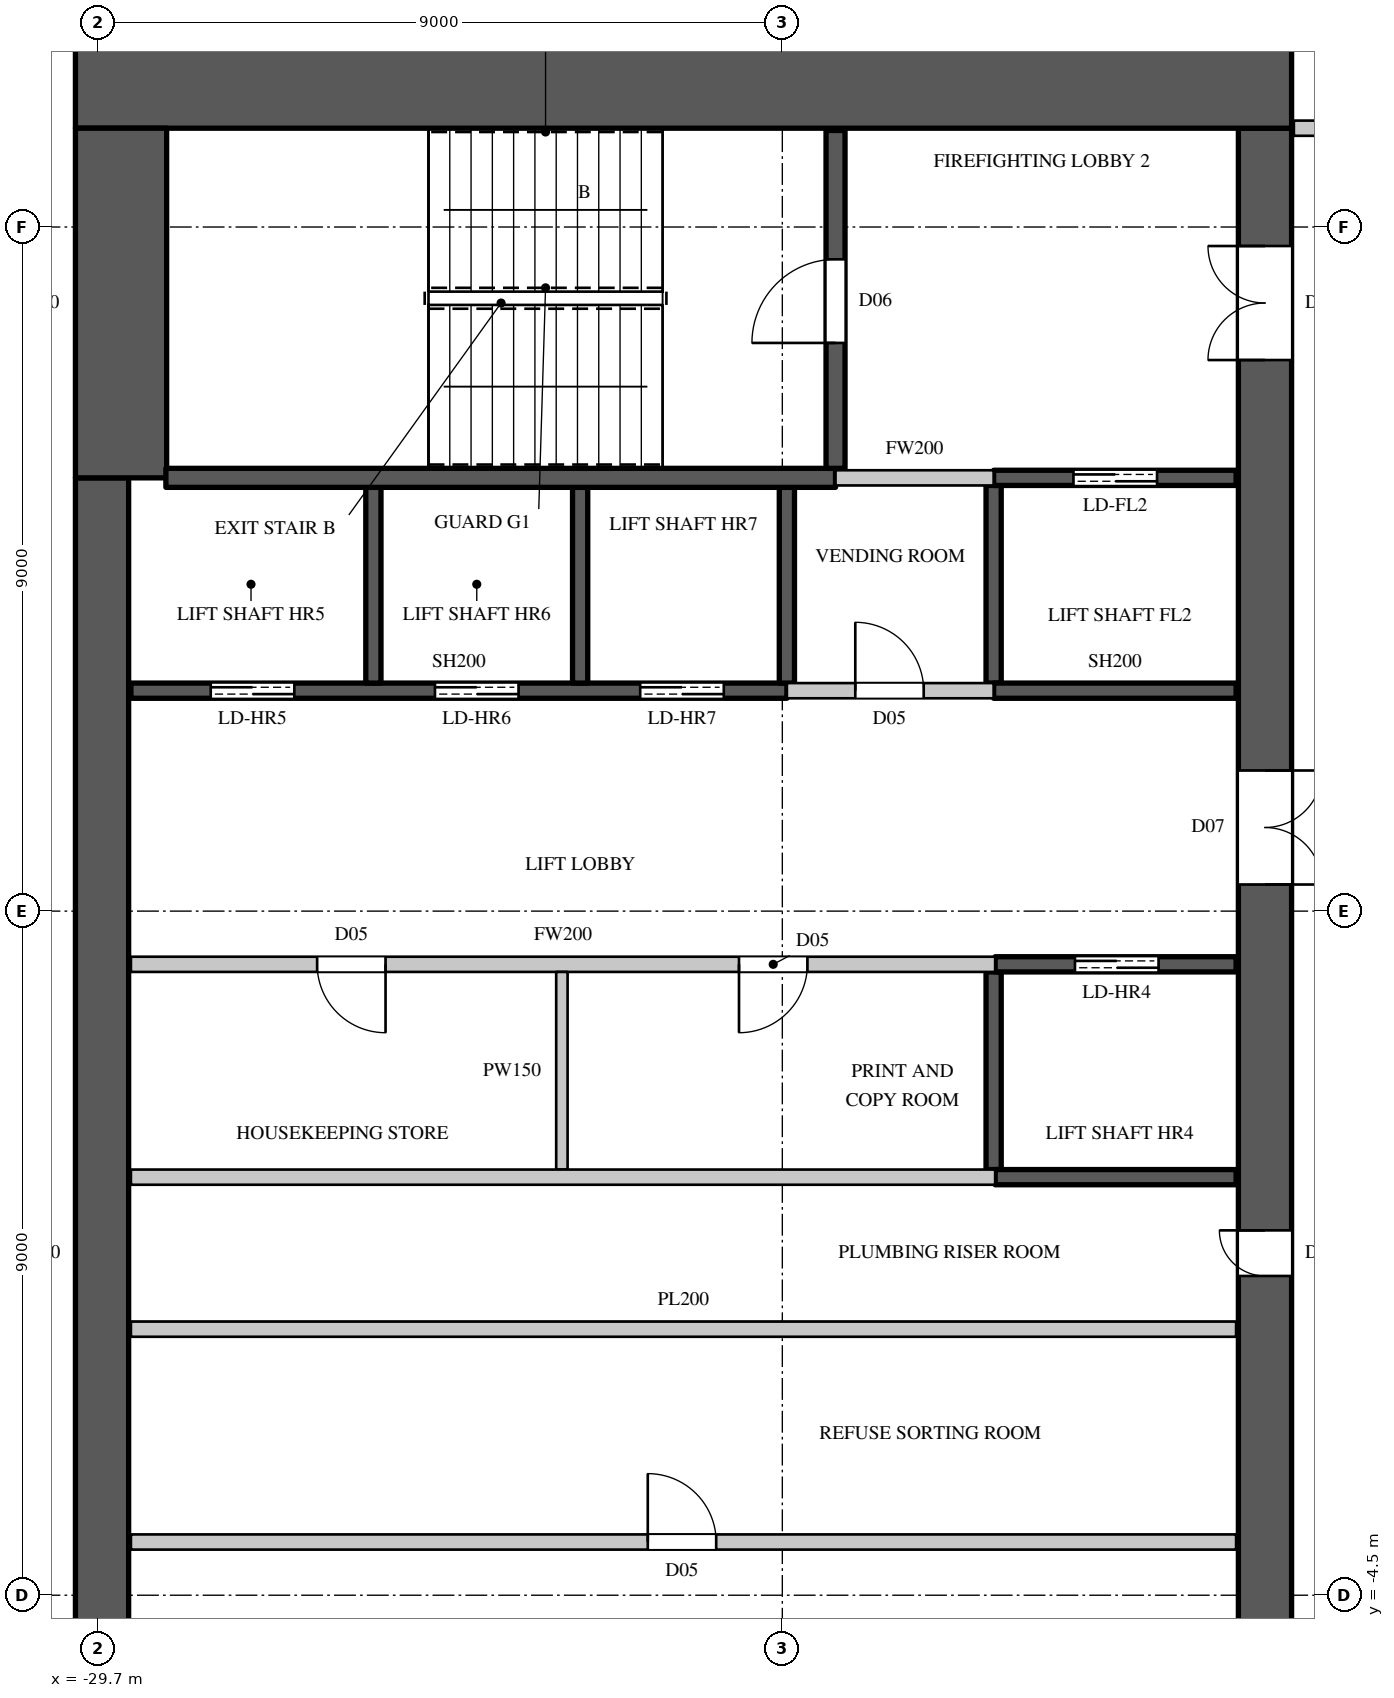
"""IFC4 building model, lengths in metres.
Left out: names, types, materials, properties, quantities, classifications, styles, units other than length and angle.
Written with IfcOpenShell. Run it as: python <this file> out.ifc"""

import sys

from ifc_helpers import new_model, si_unit, direction, frame, frame_2d, origin, place, context, subcontext, project, spatial, rectangle, extrude, element, fill, save


model = new_model("IFC4")
c1 = context("Model", 3, precision=1e-05, world=origin(), true_north=direction((0.0, 1.0)))
c2 = subcontext(c1, "Body", "Model", "MODEL_VIEW")
j1 = project(units=[si_unit("LENGTHUNIT", "METRE"), si_unit("PLANEANGLEUNIT", "RADIAN")], contexts=[c1])
p1 = place(None, origin())
s1 = spatial("IfcSite", under=j1, at=p1, CompositionType="ELEMENT")
p2 = place(p1, origin())
s2 = spatial("IfcBuilding", under=s1, at=p2, CompositionType="ELEMENT")
p3 = place(p2, frame((0.0, 0.0, 304.9)))
s3 = spatial("IfcBuildingStorey", under=s2, at=p3, CompositionType="ELEMENT", Elevation=304.9)
p4 = place(p3, frame((-30.0, 15.4, 0.0), z_axis=(0.0, 0.0, 1.0), x_axis=(1.0, 0.0, 0.0)))
e1 = element("IfcWall", 1, at=p4, inside=s3, PredefinedType="SHEAR", context=c2, shape_type="SweptSolid", body=[
    extrude(rectangle(XDim=16.0, YDim=1.2, at=frame_2d((8.0, 0.0))), origin(), (0.0, 0.0, 1.0), 4.1),
])
p5 = place(p3, frame((-14.35, -14.8, 0.0), z_axis=(0.0, 0.0, 1.0), x_axis=(0.0, 1.0, 0.0)))
e2 = element("IfcWall", 2, at=p5, inside=s3, PredefinedType="SHEAR", context=c2, shape_type="SweptSolid", body=[
    extrude(rectangle(XDim=29.6, YDim=0.7, at=frame_2d((14.8, 0.0))), origin(), (0.0, 0.0, 1.0), 4.1),
])
p6 = place(p5, frame((1.55, 0.0, 0.0)))
e3 = element("IfcOpeningElement", 3, at=p6, cuts=e2, PredefinedType="OPENING", context=c2, shape_type="SweptSolid", body=[
    extrude(rectangle(XDim=1.5, YDim=2.4, at=frame_2d((0.75, 1.2))), frame((0.0, 0.36, 0.0), z_axis=(0.0, -1.0, 0.0), x_axis=(1.0, 0.0, 0.0)), (0.0, 0.0, 1.0), 0.72),
])
p7 = place(p5, frame((26.55, 0.0, 0.0)))
e4 = element("IfcOpeningElement", 4, at=p7, cuts=e2, PredefinedType="OPENING", context=c2, shape_type="SweptSolid", body=[
    extrude(rectangle(XDim=1.5, YDim=2.4, at=frame_2d((0.75, 1.2))), frame((0.0, 0.36, 0.0), z_axis=(0.0, -1.0, 0.0), x_axis=(1.0, 0.0, 0.0)), (0.0, 0.0, 1.0), 0.72),
])
p8 = place(p5, frame((8.45, 0.0, 0.0)))
e5 = element("IfcOpeningElement", 5, at=p8, cuts=e2, PredefinedType="OPENING", context=c2, shape_type="SweptSolid", body=[
    extrude(rectangle(XDim=1.5, YDim=2.4, at=frame_2d((0.75, 1.2))), frame((0.0, 0.36, 0.0), z_axis=(0.0, -1.0, 0.0), x_axis=(1.0, 0.0, 0.0)), (0.0, 0.0, 1.0), 0.72),
])
p9 = place(p5, frame((19.65, 0.0, 0.0)))
e6 = element("IfcOpeningElement", 6, at=p9, cuts=e2, PredefinedType="OPENING", context=c2, shape_type="SweptSolid", body=[
    extrude(rectangle(XDim=1.5, YDim=2.4, at=frame_2d((0.75, 1.2))), frame((0.0, 0.36, 0.0), z_axis=(0.0, -1.0, 0.0), x_axis=(1.0, 0.0, 0.0)), (0.0, 0.0, 1.0), 0.72),
])
p10 = place(p5, frame((14.5, 0.0, 0.0)))
e7 = element("IfcOpeningElement", 7, at=p10, cuts=e2, PredefinedType="OPENING", context=c2, shape_type="SweptSolid", body=[
    extrude(rectangle(XDim=0.6, YDim=2.0, at=frame_2d((0.3, 1.0))), frame((0.0, 0.36, 0.0), z_axis=(0.0, -1.0, 0.0), x_axis=(1.0, 0.0, 0.0)), (0.0, 0.0, 1.0), 0.72),
])
p11 = place(p3, frame((-29.65, -10.2, 0.0), z_axis=(0.0, 0.0, 1.0), x_axis=(0.0, 1.0, 0.0)))
e8 = element("IfcWall", 8, at=p11, inside=s3, PredefinedType="SHEAR", context=c2, shape_type="SweptSolid", body=[
    extrude(rectangle(XDim=20.4, YDim=0.7, at=frame_2d((10.2, 0.0))), origin(), (0.0, 0.0, 1.0), 4.1),
])
p12 = place(p3, frame((-29.4, 10.2, 0.0), z_axis=(0.0, 0.0, 1.0), x_axis=(0.0, 1.0, 0.0)))
e9 = element("IfcWall", 9, at=p12, inside=s3, PredefinedType="SHEAR", context=c2, shape_type="SweptSolid", body=[
    extrude(rectangle(XDim=4.6, YDim=1.2, at=frame_2d((2.3, 0.0))), origin(), (0.0, 0.0, 1.0), 4.1),
])
p13 = place(p3, frame((-29.27, -3.8, 0.0), z_axis=(0.0, 0.0, 1.0), x_axis=(1.0, 0.0, 0.0)))
e10 = element("IfcWall", 10, at=p13, inside=s3, PredefinedType="PARTITIONING", context=c2, shape_type="SweptSolid", body=[
    extrude(rectangle(XDim=14.54, YDim=0.2, at=frame_2d((7.27, 0.0))), origin(), (0.0, 0.0, 1.0), 3.8),
])
p14 = place(p13, frame((6.8, 0.0, 0.0)))
e11 = element("IfcOpeningElement", 11, at=p14, cuts=e10, PredefinedType="OPENING", context=c2, shape_type="SweptSolid", body=[
    extrude(rectangle(XDim=0.9, YDim=2.2, at=frame_2d((0.45, 1.1))), frame((0.0, 0.11, 0.0), z_axis=(0.0, -1.0, 0.0), x_axis=(1.0, 0.0, 0.0)), (0.0, 0.0, 1.0), 0.22),
])
p15 = place(p3, frame((-29.27, 3.8, 0.0), z_axis=(0.0, 0.0, 1.0), x_axis=(1.0, 0.0, 0.0)))
e12 = element("IfcWall", 12, at=p15, inside=s3, PredefinedType="PARTITIONING", context=c2, shape_type="SweptSolid", body=[
    extrude(rectangle(XDim=11.37, YDim=0.2, at=frame_2d((5.685, 0.0))), origin(), (0.0, 0.0, 1.0), 3.8),
])
p16 = place(p15, frame((2.45, 0.0, 0.0)))
e13 = element("IfcOpeningElement", 13, at=p16, cuts=e12, PredefinedType="OPENING", context=c2, shape_type="SweptSolid", body=[
    extrude(rectangle(XDim=0.9, YDim=2.2, at=frame_2d((0.45, 1.1))), frame((0.0, 0.11, 0.0), z_axis=(0.0, -1.0, 0.0), x_axis=(1.0, 0.0, 0.0)), (0.0, 0.0, 1.0), 0.22),
])
p17 = place(p15, frame((8.0, 0.0, 0.0)))
e14 = element("IfcOpeningElement", 14, at=p17, cuts=e12, PredefinedType="OPENING", context=c2, shape_type="SweptSolid", body=[
    extrude(rectangle(XDim=0.9, YDim=2.2, at=frame_2d((0.45, 1.1))), frame((0.0, 0.11, 0.0), z_axis=(0.0, -1.0, 0.0), x_axis=(1.0, 0.0, 0.0)), (0.0, 0.0, 1.0), 0.22),
])
p18 = place(p3, frame((-20.64, 7.4, 0.0), z_axis=(0.0, 0.0, 1.0), x_axis=(1.0, 0.0, 0.0)))
e15 = element("IfcWall", 15, at=p18, inside=s3, PredefinedType="PARTITIONING", context=c2, shape_type="SweptSolid", body=[
    extrude(rectangle(XDim=2.72, YDim=0.2, at=frame_2d((1.36, 0.0))), origin(), (0.0, 0.0, 1.0), 3.8),
])
p19 = place(p18, frame((0.9, 0.0, 0.0)))
e16 = element("IfcOpeningElement", 16, at=p19, cuts=e15, PredefinedType="OPENING", context=c2, shape_type="SweptSolid", body=[
    extrude(rectangle(XDim=0.9, YDim=2.2, at=frame_2d((0.45, 1.1))), frame((0.0, 0.11, 0.0), z_axis=(0.0, -1.0, 0.0), x_axis=(1.0, 0.0, 0.0)), (0.0, 0.0, 1.0), 0.22),
])
p20 = place(p3, frame((-20.0, 10.2, 0.0), z_axis=(0.0, 0.0, 1.0), x_axis=(1.0, 0.0, 0.0)))
e17 = element("IfcWall", 17, at=p20, inside=s3, PredefinedType="PARTITIONING", context=c2, shape_type="SweptSolid", body=[
    extrude(rectangle(XDim=2.08, YDim=0.2, at=frame_2d((1.04, 0.0))), origin(), (0.0, 0.0, 1.0), 3.8),
])
p21 = place(p3, frame((-13.97, 14.8, 0.0), z_axis=(0.0, 0.0, 1.0), x_axis=(1.0, 0.0, 0.0)))
e18 = element("IfcWall", 18, at=p21, inside=s3, PredefinedType="PARTITIONING", context=c2, shape_type="SweptSolid", body=[
    extrude(rectangle(XDim=3.07, YDim=0.2, at=frame_2d((1.535, 0.0))), origin(), (0.0, 0.0, 1.0), 3.8),
])
p22 = place(p3, frame((-23.6, 1.1, 0.0), z_axis=(0.0, 0.0, 1.0), x_axis=(0.0, 1.0, 0.0)))
e19 = element("IfcWall", 19, at=p22, inside=s3, PredefinedType="PARTITIONING", context=c2, shape_type="SweptSolid", body=[
    extrude(rectangle(XDim=2.6, YDim=0.15, at=frame_2d((1.3, 0.0))), origin(), (0.0, 0.0, 1.0), 3.8),
])
p23 = place(p3, frame((-29.27, -1.0, 0.0), z_axis=(0.0, 0.0, 1.0), x_axis=(1.0, 0.0, 0.0)))
e20 = element("IfcWall", 20, at=p23, inside=s3, PredefinedType="PARTITIONING", context=c2, shape_type="SweptSolid", body=[
    extrude(rectangle(XDim=14.54, YDim=0.2, at=frame_2d((7.27, 0.0))), origin(), (0.0, 0.0, 1.0), 3.8),
])
p24 = place(p3, frame((-29.27, 1.0, 0.0), z_axis=(0.0, 0.0, 1.0), x_axis=(1.0, 0.0, 0.0)))
e21 = element("IfcWall", 21, at=p24, inside=s3, PredefinedType="PARTITIONING", context=c2, shape_type="SweptSolid", body=[
    extrude(rectangle(XDim=11.37, YDim=0.2, at=frame_2d((5.685, 0.0))), origin(), (0.0, 0.0, 1.0), 3.8),
])
p25 = place(p3, frame((-29.27, 7.4, 0.0), z_axis=(0.0, 0.0, 1.0), x_axis=(1.0, 0.0, 0.0)))
e22 = element("IfcWall", 22, at=p25, inside=s3, PredefinedType="SHEAR", context=c2, shape_type="SweptSolid", body=[
    extrude(rectangle(XDim=8.63, YDim=0.2, at=frame_2d((4.315, 0.0))), origin(), (0.0, 0.0, 1.0), 3.8),
])
p26 = place(p25, frame((1.05, 0.0, 0.0)))
e23 = element("IfcOpeningElement", 23, at=p26, cuts=e22, PredefinedType="OPENING", context=c2, shape_type="SweptSolid", body=[
    extrude(rectangle(XDim=1.1, YDim=2.2, at=frame_2d((0.55, 1.1))), frame((0.0, 0.11, 0.0), z_axis=(0.0, -1.0, 0.0), x_axis=(1.0, 0.0, 0.0)), (0.0, 0.0, 1.0), 0.22),
])
p27 = place(p25, frame((4.0, 0.0, 0.0)))
e24 = element("IfcOpeningElement", 24, at=p27, cuts=e22, PredefinedType="OPENING", context=c2, shape_type="SweptSolid", body=[
    extrude(rectangle(XDim=1.1, YDim=2.2, at=frame_2d((0.55, 1.1))), frame((0.0, 0.11, 0.0), z_axis=(0.0, -1.0, 0.0), x_axis=(1.0, 0.0, 0.0)), (0.0, 0.0, 1.0), 0.22),
])
p28 = place(p25, frame((6.7, 0.0, 0.0)))
e25 = element("IfcOpeningElement", 25, at=p28, cuts=e22, PredefinedType="OPENING", context=c2, shape_type="SweptSolid", body=[
    extrude(rectangle(XDim=1.1, YDim=2.2, at=frame_2d((0.55, 1.1))), frame((0.0, 0.11, 0.0), z_axis=(0.0, -1.0, 0.0), x_axis=(1.0, 0.0, 0.0)), (0.0, 0.0, 1.0), 0.22),
])
for number, where, z_axis, x_axis in (
    (26, (-26.08, 7.5, 0.0), (0.0, 0.0, 1.0), (0.0, 1.0, 0.0)),
    (27, (-23.36, 7.5, 0.0), (0.0, 0.0, 1.0), (0.0, 1.0, 0.0)),
):
    element("IfcWall", number, at=place(p3, frame(where, z_axis=z_axis, x_axis=x_axis)), inside=s3, PredefinedType="SHEAR", context=c2, shape_type="SweptSolid", body=[
        extrude(rectangle(XDim=2.575, YDim=0.2, at=frame_2d((1.288, 0.0))), origin(), (0.0, 0.0, 1.0), 4.1),
    ])
p29 = place(p3, frame((-20.64, 7.5, 0.0), z_axis=(0.0, 0.0, 1.0), x_axis=(0.0, 1.0, 0.0)))
e28 = element("IfcWall", 28, at=p29, inside=s3, PredefinedType="SHEAR", context=c2, shape_type="SweptSolid", body=[
    extrude(rectangle(XDim=2.575, YDim=0.2, at=frame_2d((1.288, 0.0))), origin(), (0.0, 0.0, 1.0), 3.8),
])
p30 = place(p3, frame((-17.92, 1.1, 0.0), z_axis=(0.0, 0.0, 1.0), x_axis=(0.0, 1.0, 0.0)))
e29 = element("IfcWall", 29, at=p30, inside=s3, PredefinedType="SHEAR", context=c2, shape_type="SweptSolid", body=[
    extrude(rectangle(XDim=2.6, YDim=0.2, at=frame_2d((1.3, 0.0))), origin(), (0.0, 0.0, 1.0), 3.8),
])
p31 = place(p3, frame((-17.9, 1.0, 0.0), z_axis=(0.0, 0.0, 1.0), x_axis=(1.0, 0.0, 0.0)))
e30 = element("IfcWall", 30, at=p31, inside=s3, PredefinedType="SHEAR", context=c2, shape_type="SweptSolid", body=[
    extrude(rectangle(XDim=3.17, YDim=0.2, at=frame_2d((1.585, 0.0))), origin(), (0.0, 0.0, 1.0), 3.8),
])
p32 = place(p3, frame((-17.9, 3.8, 0.0), z_axis=(0.0, 0.0, 1.0), x_axis=(1.0, 0.0, 0.0)))
e31 = element("IfcWall", 31, at=p32, inside=s3, PredefinedType="SHEAR", context=c2, shape_type="SweptSolid", body=[
    extrude(rectangle(XDim=3.17, YDim=0.2, at=frame_2d((1.585, 0.0))), origin(), (0.0, 0.0, 1.0), 3.8),
])
p33 = place(p32, frame((1.05, 0.0, 0.0)))
e32 = element("IfcOpeningElement", 32, at=p33, cuts=e31, PredefinedType="OPENING", context=c2, shape_type="SweptSolid", body=[
    extrude(rectangle(XDim=1.1, YDim=2.2, at=frame_2d((0.55, 1.1))), frame((0.0, 0.11, 0.0), z_axis=(0.0, -1.0, 0.0), x_axis=(1.0, 0.0, 0.0)), (0.0, 0.0, 1.0), 0.22),
])
p34 = place(p3, frame((-17.92, 7.5, 0.0), z_axis=(0.0, 0.0, 1.0), x_axis=(0.0, 1.0, 0.0)))
e33 = element("IfcWall", 33, at=p34, inside=s3, PredefinedType="SHEAR", context=c2, shape_type="SweptSolid", body=[
    extrude(rectangle(XDim=2.6, YDim=0.2, at=frame_2d((1.3, 0.0))), origin(), (0.0, 0.0, 1.0), 3.8),
])
p35 = place(p3, frame((-17.92, 7.4, 0.0), z_axis=(0.0, 0.0, 1.0), x_axis=(1.0, 0.0, 0.0)))
e34 = element("IfcWall", 34, at=p35, inside=s3, PredefinedType="SHEAR", context=c2, shape_type="SweptSolid", body=[
    extrude(rectangle(XDim=3.19, YDim=0.2, at=frame_2d((1.595, 0.0))), origin(), (0.0, 0.0, 1.0), 3.8),
])
p36 = place(p3, frame((-17.92, 10.2, 0.0), z_axis=(0.0, 0.0, 1.0), x_axis=(1.0, 0.0, 0.0)))
e35 = element("IfcWall", 35, at=p36, inside=s3, PredefinedType="SHEAR", context=c2, shape_type="SweptSolid", body=[
    extrude(rectangle(XDim=3.19, YDim=0.2, at=frame_2d((1.595, 0.0))), origin(), (0.0, 0.0, 1.0), 3.8),
])
p37 = place(p36, frame((1.05, 0.0, 0.0)))
e36 = element("IfcOpeningElement", 36, at=p37, cuts=e35, PredefinedType="OPENING", context=c2, shape_type="SweptSolid", body=[
    extrude(rectangle(XDim=1.1, YDim=2.2, at=frame_2d((0.55, 1.1))), frame((0.0, 0.11, 0.0), z_axis=(0.0, -1.0, 0.0), x_axis=(1.0, 0.0, 0.0)), (0.0, 0.0, 1.0), 0.22),
])
p38 = place(p3, frame((-28.81, 10.2, 0.0), z_axis=(0.0, 0.0, 1.0), x_axis=(1.0, 0.0, 0.0)))
e37 = element("IfcWall", 37, at=p38, inside=s3, PredefinedType="SHEAR", context=c2, shape_type="SweptSolid", body=[
    extrude(rectangle(XDim=8.81, YDim=0.25, at=frame_2d((4.405, 0.0))), origin(), (0.0, 0.0, 1.0), 3.8),
])
p39 = place(p3, frame((-20.0, 10.325, 0.0), z_axis=(0.0, 0.0, 1.0), x_axis=(0.0, 1.0, 0.0)))
e38 = element("IfcWall", 38, at=p39, inside=s3, PredefinedType="SHEAR", context=c2, shape_type="SweptSolid", body=[
    extrude(rectangle(XDim=4.445, YDim=0.25, at=frame_2d((2.223, 0.0))), origin(), (0.0, 0.0, 1.0), 3.8),
])
p40 = place(p39, frame((1.65, 0.0, 0.0)))
e39 = element("IfcOpeningElement", 39, at=p40, cuts=e38, PredefinedType="OPENING", context=c2, shape_type="SweptSolid", body=[
    extrude(rectangle(XDim=1.1, YDim=2.2, at=frame_2d((0.55, 1.1))), frame((0.0, 0.135, 0.0), z_axis=(0.0, -1.0, 0.0), x_axis=(1.0, 0.0, 0.0)), (0.0, 0.0, 1.0), 0.27),
])
p41 = place(p40, origin())
e40 = element("IfcDoor", 40, at=p41, inside=s3, OperationType="SINGLE_SWING_LEFT", PredefinedType="DOOR", context=c2, shape_type="SweptSolid", body=[
    extrude(rectangle(XDim=1.1, YDim=2.2, at=frame_2d((0.55, 1.1))), frame((0.0, 0.025, 0.0), z_axis=(0.0, -1.0, 0.0), x_axis=(1.0, 0.0, 0.0)), (0.0, 0.0, 1.0), 0.05),
])
fill(e39, e40)
p42 = place(p14, origin())
e41 = element("IfcDoor", 41, at=p42, inside=s3, OperationType="SINGLE_SWING_LEFT", PredefinedType="DOOR", context=c2, shape_type="SweptSolid", body=[
    extrude(rectangle(XDim=0.9, YDim=2.2, at=frame_2d((0.45, 1.1))), frame((0.0, 0.025, 0.0), z_axis=(0.0, -1.0, 0.0), x_axis=(1.0, 0.0, 0.0)), (0.0, 0.0, 1.0), 0.05),
])
fill(e11, e41)
p43 = place(p16, origin())
e42 = element("IfcDoor", 42, at=p43, inside=s3, OperationType="SINGLE_SWING_LEFT", PredefinedType="DOOR", context=c2, shape_type="SweptSolid", body=[
    extrude(rectangle(XDim=0.9, YDim=2.2, at=frame_2d((0.45, 1.1))), frame((0.0, 0.025, 0.0), z_axis=(0.0, -1.0, 0.0), x_axis=(1.0, 0.0, 0.0)), (0.0, 0.0, 1.0), 0.05),
])
fill(e13, e42)
p44 = place(p17, origin())
e43 = element("IfcDoor", 43, at=p44, inside=s3, OperationType="SINGLE_SWING_RIGHT", PredefinedType="DOOR", context=c2, shape_type="SweptSolid", body=[
    extrude(rectangle(XDim=0.9, YDim=2.2, at=frame_2d((0.45, 1.1))), frame((0.0, 0.025, 0.0), z_axis=(0.0, -1.0, 0.0), x_axis=(1.0, 0.0, 0.0)), (0.0, 0.0, 1.0), 0.05),
])
fill(e14, e43)
p45 = place(p19, origin())
e44 = element("IfcDoor", 44, at=p45, inside=s3, OperationType="SINGLE_SWING_LEFT", PredefinedType="DOOR", context=c2, shape_type="SweptSolid", body=[
    extrude(rectangle(XDim=0.9, YDim=2.2, at=frame_2d((0.45, 1.1))), frame((0.0, 0.025, 0.0), z_axis=(0.0, -1.0, 0.0), x_axis=(1.0, 0.0, 0.0)), (0.0, 0.0, 1.0), 0.05),
])
fill(e16, e44)
p46 = place(p33, origin())
e45 = element("IfcDoor", 45, at=p46, inside=s3, OperationType="DOUBLE_DOOR_SLIDING", PredefinedType="DOOR", context=c2, shape_type="SweptSolid", body=[
    extrude(rectangle(XDim=1.1, YDim=2.2, at=frame_2d((0.55, 1.1))), frame((0.0, 0.025, 0.0), z_axis=(0.0, -1.0, 0.0), x_axis=(1.0, 0.0, 0.0)), (0.0, 0.0, 1.0), 0.05),
])
fill(e32, e45)
p47 = place(p26, origin())
e46 = element("IfcDoor", 46, at=p47, inside=s3, OperationType="DOUBLE_DOOR_SLIDING", PredefinedType="DOOR", context=c2, shape_type="SweptSolid", body=[
    extrude(rectangle(XDim=1.1, YDim=2.2, at=frame_2d((0.55, 1.1))), frame((0.0, 0.025, 0.0), z_axis=(0.0, -1.0, 0.0), x_axis=(1.0, 0.0, 0.0)), (0.0, 0.0, 1.0), 0.05),
])
fill(e23, e46)
p48 = place(p27, origin())
e47 = element("IfcDoor", 47, at=p48, inside=s3, OperationType="DOUBLE_DOOR_SLIDING", PredefinedType="DOOR", context=c2, shape_type="SweptSolid", body=[
    extrude(rectangle(XDim=1.1, YDim=2.2, at=frame_2d((0.55, 1.1))), frame((0.0, 0.025, 0.0), z_axis=(0.0, -1.0, 0.0), x_axis=(1.0, 0.0, 0.0)), (0.0, 0.0, 1.0), 0.05),
])
fill(e24, e47)
p49 = place(p28, origin())
e48 = element("IfcDoor", 48, at=p49, inside=s3, OperationType="DOUBLE_DOOR_SLIDING", PredefinedType="DOOR", context=c2, shape_type="SweptSolid", body=[
    extrude(rectangle(XDim=1.1, YDim=2.2, at=frame_2d((0.55, 1.1))), frame((0.0, 0.025, 0.0), z_axis=(0.0, -1.0, 0.0), x_axis=(1.0, 0.0, 0.0)), (0.0, 0.0, 1.0), 0.05),
])
fill(e25, e48)
p50 = place(p37, origin())
e49 = element("IfcDoor", 49, at=p50, inside=s3, OperationType="DOUBLE_DOOR_SLIDING", PredefinedType="DOOR", context=c2, shape_type="SweptSolid", body=[
    extrude(rectangle(XDim=1.1, YDim=2.2, at=frame_2d((0.55, 1.1))), frame((0.0, 0.025, 0.0), z_axis=(0.0, -1.0, 0.0), x_axis=(1.0, 0.0, 0.0)), (0.0, 0.0, 1.0), 0.05),
])
fill(e36, e49)
p51 = place(p7, origin())
e50 = element("IfcDoor", 50, at=p51, inside=s3, OperationType="DOUBLE_DOOR_SINGLE_SWING", PredefinedType="DOOR", context=c2, shape_type="SweptSolid", body=[
    extrude(rectangle(XDim=1.5, YDim=2.4, at=frame_2d((0.75, 1.2))), frame((0.0, 0.345, 0.0), z_axis=(0.0, -1.0, 0.0), x_axis=(1.0, 0.0, 0.0)), (0.0, 0.0, 1.0), 0.05),
])
fill(e4, e50)
p52 = place(p9, origin())
e51 = element("IfcDoor", 51, at=p52, inside=s3, OperationType="DOUBLE_DOOR_SINGLE_SWING", PredefinedType="DOOR", context=c2, shape_type="SweptSolid", body=[
    extrude(rectangle(XDim=1.5, YDim=2.4, at=frame_2d((0.75, 1.2))), frame((0.0, -0.295, 0.0), z_axis=(0.0, -1.0, 0.0), x_axis=(1.0, 0.0, 0.0)), (0.0, 0.0, 1.0), 0.05),
])
fill(e6, e51)
p53 = place(p10, origin())
e52 = element("IfcDoor", 52, at=p53, inside=s3, OperationType="SINGLE_SWING_RIGHT", PredefinedType="DOOR", context=c2, shape_type="SweptSolid", body=[
    extrude(rectangle(XDim=0.6, YDim=2.0, at=frame_2d((0.3, 1.0))), frame((0.0, 0.345, 0.0), z_axis=(0.0, -1.0, 0.0), x_axis=(1.0, 0.0, 0.0)), (0.0, 0.0, 1.0), 0.05),
])
fill(e7, e52)
save(model, sys.argv[1])
